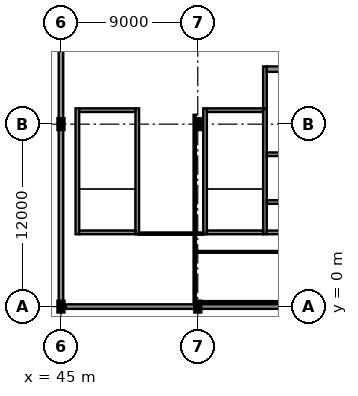
"""IFC4 building model, lengths in metres.
Left out: names, types, materials, properties, quantities, classifications, styles, units other than length and angle.
Written with IfcOpenShell. Run it as: python <this file> out.ifc"""

import sys

from ifc_helpers import new_model, si_unit, direction, frame, frame_2d, origin, origin_2d, place, context, subcontext, project, spatial, rectangle, i_section, extrude, element, fill, save


model = new_model("IFC4")
c1 = context("Model", 3, precision=1e-05, world=origin(), true_north=direction((0.0, 1.0)))
c2 = subcontext(c1, "Body", "Model", "MODEL_VIEW")
j1 = project(units=[si_unit("LENGTHUNIT", "METRE"), si_unit("PLANEANGLEUNIT", "RADIAN")], contexts=[c1])
p1 = place(None, origin())
s1 = spatial("IfcSite", under=j1, at=p1, CompositionType="ELEMENT")
p2 = place(p1, origin())
s2 = spatial("IfcBuilding", under=s1, at=p2, CompositionType="ELEMENT")
p3 = place(p2, frame((0.0, 0.0, 18.9)))
s3 = spatial("IfcBuildingStorey", under=s2, at=p3, CompositionType="ELEMENT", Elevation=18.9)
for number, where, z_axis, x_axis in (
    (1, (45.0, 0.0, 0.0), (0.0, 0.0, 1.0), (0.0, 1.0, 0.0)),
    (2, (45.0, 12.0, 0.0), (0.0, 0.0, 1.0), (1.0, 0.0, 0.0)),
    (3, (54.0, 0.0, 0.0), (0.0, 0.0, 1.0), (1.0, 0.0, 0.0)),
    (4, (54.0, 12.0, 0.0), (0.0, 0.0, 1.0), (1.0, 0.0, 0.0)),
):
    element("IfcColumn", number, at=place(p3, frame(where, z_axis=z_axis, x_axis=x_axis)), inside=s3, PredefinedType="COLUMN", context=c2, shape_type="SweptSolid", body=[
        extrude(i_section(OverallWidth=0.305, OverallDepth=0.62, WebThickness=0.021, FlangeThickness=0.04, at=origin_2d()), origin(), (0.0, 0.0, 1.0), 4.5),
    ])
p4 = place(p3, frame((45.308, 0.0, 0.0), z_axis=(0.0, 0.0, 1.0), x_axis=(1.0, 0.0, 0.0)))
e5 = element("IfcWall", 5, at=p4, inside=s3, PredefinedType="SOLIDWALL", context=c2, shape_type="SweptSolid", body=[
    extrude(rectangle(XDim=8.684, YDim=0.3, at=frame_2d((4.342, 0.0))), origin(), (0.0, 0.0, 1.0), 3.655),
])
p5 = place(p4, frame((1.432, 0.0, 0.85)))
e6 = element("IfcOpeningElement", 6, at=p5, cuts=e5, PredefinedType="OPENING", context=c2, shape_type="SweptSolid", body=[
    extrude(rectangle(XDim=2.0, YDim=2.0, at=frame_2d((1.0, 1.0))), frame((0.0, 0.165, 0.0), z_axis=(0.0, -1.0, 0.0), x_axis=(1.0, 0.0, 0.0)), (0.0, 0.0, 1.0), 0.33),
])
p6 = place(p4, frame((5.252, 0.0, 0.85)))
e7 = element("IfcOpeningElement", 7, at=p6, cuts=e5, PredefinedType="OPENING", context=c2, shape_type="SweptSolid", body=[
    extrude(rectangle(XDim=2.0, YDim=2.0, at=frame_2d((1.0, 1.0))), frame((0.0, 0.165, 0.0), z_axis=(0.0, -1.0, 0.0), x_axis=(1.0, 0.0, 0.0)), (0.0, 0.0, 1.0), 0.33),
])
p7 = place(p3, frame((54.008, 0.0, 0.0), z_axis=(0.0, 0.0, 1.0), x_axis=(1.0, 0.0, 0.0)))
e8 = element("IfcWall", 8, at=p7, inside=s3, PredefinedType="SOLIDWALL", context=c2, shape_type="SweptSolid", body=[
    extrude(rectangle(XDim=8.984, YDim=0.3, at=frame_2d((4.492, 0.0))), origin(), (0.0, 0.0, 1.0), 3.655),
])
p8 = place(p7, frame((1.516, 0.0, 0.85)))
e9 = element("IfcOpeningElement", 9, at=p8, cuts=e8, PredefinedType="OPENING", context=c2, shape_type="SweptSolid", body=[
    extrude(rectangle(XDim=2.0, YDim=2.0, at=frame_2d((1.0, 1.0))), frame((0.0, 0.165, 0.0), z_axis=(0.0, -1.0, 0.0), x_axis=(1.0, 0.0, 0.0)), (0.0, 0.0, 1.0), 0.33),
])
p9 = place(p7, frame((5.468, 0.0, 0.85)))
e10 = element("IfcOpeningElement", 10, at=p9, cuts=e8, PredefinedType="OPENING", context=c2, shape_type="SweptSolid", body=[
    extrude(rectangle(XDim=2.0, YDim=2.0, at=frame_2d((1.0, 1.0))), frame((0.0, 0.165, 0.0), z_axis=(0.0, -1.0, 0.0), x_axis=(1.0, 0.0, 0.0)), (0.0, 0.0, 1.0), 0.33),
])
p10 = place(p3, frame((45.0, 23.644, 0.0), z_axis=(0.0, 0.0, 1.0), x_axis=(0.0, -1.0, 0.0)))
e11 = element("IfcWall", 11, at=p10, inside=s3, PredefinedType="SOLIDWALL", context=c2, shape_type="SweptSolid", body=[
    extrude(rectangle(XDim=11.336, YDim=0.3, at=frame_2d((5.668, 0.0))), origin(), (0.0, 0.0, 1.0), 3.705),
])
p11 = place(p10, frame((2.174, 0.0, 0.85)))
e12 = element("IfcOpeningElement", 12, at=p11, cuts=e11, PredefinedType="OPENING", context=c2, shape_type="SweptSolid", body=[
    extrude(rectangle(XDim=2.0, YDim=2.0, at=frame_2d((1.0, 1.0))), frame((0.0, 0.165, 0.0), z_axis=(0.0, -1.0, 0.0), x_axis=(1.0, 0.0, 0.0)), (0.0, 0.0, 1.0), 0.33),
])
p12 = place(p10, frame((5.604, 0.0, 0.85)))
e13 = element("IfcOpeningElement", 13, at=p12, cuts=e11, PredefinedType="OPENING", context=c2, shape_type="SweptSolid", body=[
    extrude(rectangle(XDim=2.0, YDim=2.0, at=frame_2d((1.0, 1.0))), frame((0.0, 0.165, 0.0), z_axis=(0.0, -1.0, 0.0), x_axis=(1.0, 0.0, 0.0)), (0.0, 0.0, 1.0), 0.33),
])
p13 = place(p3, frame((45.0, 11.692, 0.0), z_axis=(0.0, 0.0, 1.0), x_axis=(0.0, -1.0, 0.0)))
e14 = element("IfcWall", 14, at=p13, inside=s3, PredefinedType="SOLIDWALL", context=c2, shape_type="SweptSolid", body=[
    extrude(rectangle(XDim=11.684, YDim=0.3, at=frame_2d((5.842, 0.0))), origin(), (0.0, 0.0, 1.0), 3.705),
])
p14 = place(p13, frame((2.272, 0.0, 0.85)))
e15 = element("IfcOpeningElement", 15, at=p14, cuts=e14, PredefinedType="OPENING", context=c2, shape_type="SweptSolid", body=[
    extrude(rectangle(XDim=2.0, YDim=2.0, at=frame_2d((1.0, 1.0))), frame((0.0, 0.165, 0.0), z_axis=(0.0, -1.0, 0.0), x_axis=(1.0, 0.0, 0.0)), (0.0, 0.0, 1.0), 0.33),
])
p15 = place(p13, frame((7.412, 0.0, 0.85)))
e16 = element("IfcOpeningElement", 16, at=p15, cuts=e14, PredefinedType="OPENING", context=c2, shape_type="SweptSolid", body=[
    extrude(rectangle(XDim=2.0, YDim=2.0, at=frame_2d((1.0, 1.0))), frame((0.0, 0.165, 0.0), z_axis=(0.0, -1.0, 0.0), x_axis=(1.0, 0.0, 0.0)), (0.0, 0.0, 1.0), 0.33),
])
p16 = place(p3, frame((54.48, 4.76, 0.0), z_axis=(0.0, 0.0, 1.0), x_axis=(0.0, 1.0, 0.0)))
e17 = element("IfcWall", 17, at=p16, inside=s3, PredefinedType="SHEAR", context=c2, shape_type="SweptSolid", body=[
    extrude(rectangle(XDim=8.28, YDim=0.24, at=frame_2d((4.14, 0.0))), origin(), (0.0, 0.0, 1.0), 4.31),
])
p17 = place(p3, frame((58.42, 4.76, 0.0), z_axis=(0.0, 0.0, 1.0), x_axis=(0.0, 1.0, 0.0)))
e18 = element("IfcWall", 18, at=p17, inside=s3, PredefinedType="SHEAR", context=c2, shape_type="SweptSolid", body=[
    extrude(rectangle(XDim=8.28, YDim=0.24, at=frame_2d((4.14, 0.0))), origin(), (0.0, 0.0, 1.0), 4.31),
])
p18 = place(p17, frame((6.49, 0.0, 0.0)))
e19 = element("IfcOpeningElement", 19, at=p18, cuts=e18, PredefinedType="OPENING", context=c2, shape_type="SweptSolid", body=[
    extrude(rectangle(XDim=1.3, YDim=2.2, at=frame_2d((0.65, 1.1))), frame((0.0, 0.135, 0.0), z_axis=(0.0, -1.0, 0.0), x_axis=(1.0, 0.0, 0.0)), (0.0, 0.0, 1.0), 0.27),
])
for number, where, z_axis, x_axis in (
    (20, (54.6, 4.88, 0.0), (0.0, 0.0, 1.0), (1.0, 0.0, 0.0)),
    (21, (54.6, 12.92, 0.0), (0.0, 0.0, 1.0), (1.0, 0.0, 0.0)),
):
    element("IfcWall", number, at=place(p3, frame(where, z_axis=z_axis, x_axis=x_axis)), inside=s3, PredefinedType="SHEAR", context=c2, shape_type="SweptSolid", body=[
        extrude(rectangle(XDim=3.7, YDim=0.24, at=frame_2d((1.85, 0.0))), origin(), (0.0, 0.0, 1.0), 4.31),
    ])
p19 = place(p3, frame((46.08, 4.76, 0.0), z_axis=(0.0, 0.0, 1.0), x_axis=(0.0, 1.0, 0.0)))
e22 = element("IfcWall", 22, at=p19, inside=s3, PredefinedType="SHEAR", context=c2, shape_type="SweptSolid", body=[
    extrude(rectangle(XDim=8.28, YDim=0.24, at=frame_2d((4.14, 0.0))), origin(), (0.0, 0.0, 1.0), 4.31),
])
p20 = place(p3, frame((50.02, 4.76, 0.0), z_axis=(0.0, 0.0, 1.0), x_axis=(0.0, 1.0, 0.0)))
e23 = element("IfcWall", 23, at=p20, inside=s3, PredefinedType="SHEAR", context=c2, shape_type="SweptSolid", body=[
    extrude(rectangle(XDim=8.28, YDim=0.24, at=frame_2d((4.14, 0.0))), origin(), (0.0, 0.0, 1.0), 4.31),
])
p21 = place(p20, frame((6.49, 0.0, 0.0)))
e24 = element("IfcOpeningElement", 24, at=p21, cuts=e23, PredefinedType="OPENING", context=c2, shape_type="SweptSolid", body=[
    extrude(rectangle(XDim=1.3, YDim=2.2, at=frame_2d((0.65, 1.1))), frame((0.0, 0.135, 0.0), z_axis=(0.0, -1.0, 0.0), x_axis=(1.0, 0.0, 0.0)), (0.0, 0.0, 1.0), 0.27),
])
for number, where, z_axis, x_axis in (
    (25, (46.2, 4.88, 0.0), (0.0, 0.0, 1.0), (1.0, 0.0, 0.0)),
    (26, (46.2, 12.92, 0.0), (0.0, 0.0, 1.0), (1.0, 0.0, 0.0)),
):
    element("IfcWall", number, at=place(p3, frame(where, z_axis=z_axis, x_axis=x_axis)), inside=s3, PredefinedType="SHEAR", context=c2, shape_type="SweptSolid", body=[
        extrude(rectangle(XDim=3.7, YDim=0.24, at=frame_2d((1.85, 0.0))), origin(), (0.0, 0.0, 1.0), 4.31),
    ])
p22 = place(p3, frame((58.42, 13.04, 0.0), z_axis=(0.0, 0.0, 1.0), x_axis=(0.0, 1.0, 0.0)))
e27 = element("IfcWall", 27, at=p22, inside=s3, PredefinedType="SHEAR", context=c2, shape_type="SweptSolid", body=[
    extrude(rectangle(XDim=2.76, YDim=0.24, at=frame_2d((1.38, 0.0))), origin(), (0.0, 0.0, 1.0), 4.16),
])
p23 = place(p3, frame((58.54, 15.62, 0.0), z_axis=(0.0, 0.0, 1.0), x_axis=(1.0, 0.0, 0.0)))
e28 = element("IfcWall", 28, at=p23, inside=s3, PredefinedType="SHEAR", context=c2, shape_type="SweptSolid", body=[
    extrude(rectangle(XDim=3.9, YDim=0.36, at=frame_2d((1.95, 0.0))), origin(), (0.0, 0.0, 1.0), 4.16),
])
p24 = place(p23, frame((1.15, 0.0, 0.0)))
e29 = element("IfcOpeningElement", 29, at=p24, cuts=e28, PredefinedType="OPENING", context=c2, shape_type="SweptSolid", body=[
    extrude(rectangle(XDim=1.6, YDim=2.25, at=frame_2d((0.8, 1.125))), frame((0.0, 0.195, 0.0), z_axis=(0.0, -1.0, 0.0), x_axis=(1.0, 0.0, 0.0)), (0.0, 0.0, 1.0), 0.39),
])
p25 = place(p3, frame((58.54, 10.02, 0.0), z_axis=(0.0, 0.0, 1.0), x_axis=(1.0, 0.0, 0.0)))
e30 = element("IfcWall", 30, at=p25, inside=s3, PredefinedType="SHEAR", context=c2, shape_type="SweptSolid", body=[
    extrude(rectangle(XDim=3.9, YDim=0.24, at=frame_2d((1.95, 0.0))), origin(), (0.0, 0.0, 1.0), 4.31),
])
p26 = place(p25, frame((0.235, 0.0, 0.0)))
e31 = element("IfcOpeningElement", 31, at=p26, cuts=e30, PredefinedType="OPENING", context=c2, shape_type="SweptSolid", body=[
    extrude(rectangle(XDim=1.6, YDim=2.3, at=frame_2d((0.8, 1.15))), frame((0.0, 0.135, 0.0), z_axis=(0.0, -1.0, 0.0), x_axis=(1.0, 0.0, 0.0)), (0.0, 0.0, 1.0), 0.27),
])
p27 = place(p25, frame((2.185, 0.0, 0.0)))
e32 = element("IfcOpeningElement", 32, at=p27, cuts=e30, PredefinedType="OPENING", context=c2, shape_type="SweptSolid", body=[
    extrude(rectangle(XDim=1.6, YDim=2.3, at=frame_2d((0.8, 1.15))), frame((0.0, 0.135, 0.0), z_axis=(0.0, -1.0, 0.0), x_axis=(1.0, 0.0, 0.0)), (0.0, 0.0, 1.0), 0.27),
])
p28 = place(p3, frame((58.54, 6.88, 0.0), z_axis=(0.0, 0.0, 1.0), x_axis=(1.0, 0.0, 0.0)))
e33 = element("IfcWall", 33, at=p28, inside=s3, PredefinedType="SHEAR", context=c2, shape_type="SweptSolid", body=[
    extrude(rectangle(XDim=3.9, YDim=0.24, at=frame_2d((1.95, 0.0))), origin(), (0.0, 0.0, 1.0), 4.31),
])
p29 = place(p3, frame((58.54, 4.88, 0.0), z_axis=(0.0, 0.0, 1.0), x_axis=(1.0, 0.0, 0.0)))
e34 = element("IfcWall", 34, at=p29, inside=s3, PredefinedType="SHEAR", context=c2, shape_type="SweptSolid", body=[
    extrude(rectangle(XDim=2.26, YDim=0.24, at=frame_2d((1.13, 0.0))), origin(), (0.0, 0.0, 1.0), 4.31),
])
p30 = place(p3, frame((50.113, 4.8, 0.0), z_axis=(0.0, 0.0, 1.0), x_axis=(1.0, 0.0, 0.0)))
e35 = element("IfcWall", 35, at=p30, inside=s3, PredefinedType="PARTITIONING", context=c2, shape_type="SweptSolid", body=[
    extrude(rectangle(XDim=4.252, YDim=0.15, at=frame_2d((2.126, 0.0))), origin(), (0.0, 0.0, 1.0), 4.14),
])
p31 = place(p30, frame((1.601, 0.0, 0.0)))
e36 = element("IfcOpeningElement", 36, at=p31, cuts=e35, PredefinedType="OPENING", context=c2, shape_type="SweptSolid", body=[
    extrude(rectangle(XDim=1.05, YDim=2.25, at=frame_2d((0.525, 1.125))), frame((0.0, 0.09, 0.0), z_axis=(0.0, -1.0, 0.0), x_axis=(1.0, 0.0, 0.0)), (0.0, 0.0, 1.0), 0.18),
])
p32 = place(p3, frame((53.8, 4.73, 0.0), z_axis=(0.0, 0.0, 1.0), x_axis=(0.0, -1.0, 0.0)))
e37 = element("IfcWall", 37, at=p32, inside=s3, PredefinedType="PARTITIONING", context=c2, shape_type="SweptSolid", body=[
    extrude(rectangle(XDim=4.422, YDim=0.15, at=frame_2d((2.211, 0.0))), origin(), (0.0, 0.0, 1.0), 3.655),
])
p33 = place(p3, frame((107.721, 0.3, 0.0), z_axis=(0.0, 0.0, 1.0), x_axis=(-1.0, 0.0, 0.0)))
e38 = element("IfcWall", 38, at=p33, inside=s3, PredefinedType="PARTITIONING", context=c2, shape_type="SweptSolid", body=[
    extrude(rectangle(XDim=53.741, YDim=0.12, at=frame_2d((26.871, 0.0))), origin(), (0.0, 0.0, 1.0), 4.14),
])
p34 = place(p3, frame((53.87, 3.6, 0.0), z_axis=(0.0, 0.0, 1.0), x_axis=(1.0, 0.0, 0.0)))
e39 = element("IfcWall", 39, at=p34, inside=s3, PredefinedType="PARTITIONING", context=c2, shape_type="SweptSolid", body=[
    extrude(rectangle(XDim=63.25, YDim=0.12, at=frame_2d((31.625, 0.0))), origin(), (0.0, 0.0, 1.0), 4.14),
])
p35 = place(p34, frame((19.855, 0.0, 0.0)))
e40 = element("IfcOpeningElement", 40, at=p35, cuts=e39, PredefinedType="OPENING", context=c2, shape_type="SweptSolid", body=[
    extrude(rectangle(XDim=0.95, YDim=2.15, at=frame_2d((0.475, 1.075))), frame((0.0, 0.075, 0.0), z_axis=(0.0, -1.0, 0.0), x_axis=(1.0, 0.0, 0.0)), (0.0, 0.0, 1.0), 0.15),
])
p36 = place(p3, frame((53.8, 12.62, 0.0), z_axis=(0.0, 0.0, 1.0), x_axis=(0.0, -1.0, 0.0)))
e41 = element("IfcWall", 41, at=p36, inside=s3, PredefinedType="PARTITIONING", context=c2, shape_type="SweptSolid", body=[
    extrude(rectangle(XDim=7.75, YDim=0.15, at=frame_2d((3.875, 0.0))), origin(), (0.0, 0.0, 1.0), 3.655),
])
p37 = place(p5, origin())
e42 = element("IfcWindow", 42, at=p37, inside=s3, PartitioningType="SINGLE_PANEL", PredefinedType="WINDOW", context=c2, shape_type="SweptSolid", body=[
    extrude(rectangle(XDim=2.0, YDim=2.0, at=frame_2d((1.0, 1.0))), frame((0.0, 0.03, 0.0), z_axis=(0.0, -1.0, 0.0), x_axis=(1.0, 0.0, 0.0)), (0.0, 0.0, 1.0), 0.06),
])
fill(e6, e42)
p38 = place(p6, origin())
e43 = element("IfcWindow", 43, at=p38, inside=s3, PartitioningType="SINGLE_PANEL", PredefinedType="WINDOW", context=c2, shape_type="SweptSolid", body=[
    extrude(rectangle(XDim=2.0, YDim=2.0, at=frame_2d((1.0, 1.0))), frame((0.0, 0.03, 0.0), z_axis=(0.0, -1.0, 0.0), x_axis=(1.0, 0.0, 0.0)), (0.0, 0.0, 1.0), 0.06),
])
fill(e7, e43)
p39 = place(p8, origin())
e44 = element("IfcWindow", 44, at=p39, inside=s3, PartitioningType="SINGLE_PANEL", PredefinedType="WINDOW", context=c2, shape_type="SweptSolid", body=[
    extrude(rectangle(XDim=2.0, YDim=2.0, at=frame_2d((1.0, 1.0))), frame((0.0, 0.03, 0.0), z_axis=(0.0, -1.0, 0.0), x_axis=(1.0, 0.0, 0.0)), (0.0, 0.0, 1.0), 0.06),
])
fill(e9, e44)
p40 = place(p12, origin())
e45 = element("IfcWindow", 45, at=p40, inside=s3, PartitioningType="SINGLE_PANEL", PredefinedType="WINDOW", context=c2, shape_type="SweptSolid", body=[
    extrude(rectangle(XDim=2.0, YDim=2.0, at=frame_2d((1.0, 1.0))), frame((0.0, 0.03, 0.0), z_axis=(0.0, -1.0, 0.0), x_axis=(1.0, 0.0, 0.0)), (0.0, 0.0, 1.0), 0.06),
])
fill(e13, e45)
p41 = place(p14, origin())
e46 = element("IfcWindow", 46, at=p41, inside=s3, PartitioningType="SINGLE_PANEL", PredefinedType="WINDOW", context=c2, shape_type="SweptSolid", body=[
    extrude(rectangle(XDim=2.0, YDim=2.0, at=frame_2d((1.0, 1.0))), frame((0.0, 0.03, 0.0), z_axis=(0.0, -1.0, 0.0), x_axis=(1.0, 0.0, 0.0)), (0.0, 0.0, 1.0), 0.06),
])
fill(e15, e46)
p42 = place(p15, origin())
e47 = element("IfcWindow", 47, at=p42, inside=s3, PartitioningType="SINGLE_PANEL", PredefinedType="WINDOW", context=c2, shape_type="SweptSolid", body=[
    extrude(rectangle(XDim=2.0, YDim=2.0, at=frame_2d((1.0, 1.0))), frame((0.0, 0.03, 0.0), z_axis=(0.0, -1.0, 0.0), x_axis=(1.0, 0.0, 0.0)), (0.0, 0.0, 1.0), 0.06),
])
fill(e16, e47)
p43 = place(p18, frame((1.3, 0.0, 0.0), z_axis=(0.0, 0.0, 1.0), x_axis=(-1.0, 0.0, 0.0)))
e48 = element("IfcDoor", 48, at=p43, inside=s3, OperationType="SINGLE_SWING_RIGHT", PredefinedType="DOOR", context=c2, shape_type="SweptSolid", body=[
    extrude(rectangle(XDim=1.3, YDim=2.2, at=frame_2d((0.65, 1.1))), frame((0.0, 0.025, 0.0), z_axis=(0.0, -1.0, 0.0), x_axis=(1.0, 0.0, 0.0)), (0.0, 0.0, 1.0), 0.05),
])
fill(e19, e48)
p44 = place(p21, frame((1.3, 0.0, 0.0), z_axis=(0.0, 0.0, 1.0), x_axis=(-1.0, 0.0, 0.0)))
e49 = element("IfcDoor", 49, at=p44, inside=s3, OperationType="SINGLE_SWING_RIGHT", PredefinedType="DOOR", context=c2, shape_type="SweptSolid", body=[
    extrude(rectangle(XDim=1.3, YDim=2.2, at=frame_2d((0.65, 1.1))), frame((0.0, 0.025, 0.0), z_axis=(0.0, -1.0, 0.0), x_axis=(1.0, 0.0, 0.0)), (0.0, 0.0, 1.0), 0.05),
])
fill(e24, e49)
p45 = place(p26, origin())
e50 = element("IfcDoor", 50, at=p45, inside=s3, OperationType="DOUBLE_DOOR_SLIDING", PredefinedType="DOOR", context=c2, shape_type="SweptSolid", body=[
    extrude(rectangle(XDim=1.6, YDim=2.3, at=frame_2d((0.8, 1.15))), frame((0.0, 0.025, 0.0), z_axis=(0.0, -1.0, 0.0), x_axis=(1.0, 0.0, 0.0)), (0.0, 0.0, 1.0), 0.05),
])
fill(e31, e50)
p46 = place(p31, origin())
e51 = element("IfcDoor", 51, at=p46, inside=s3, OperationType="SINGLE_SWING_RIGHT", PredefinedType="DOOR", context=c2, shape_type="SweptSolid", body=[
    extrude(rectangle(XDim=1.05, YDim=2.25, at=frame_2d((0.525, 1.125))), frame((0.0, 0.025, 0.0), z_axis=(0.0, -1.0, 0.0), x_axis=(1.0, 0.0, 0.0)), (0.0, 0.0, 1.0), 0.05),
])
fill(e36, e51)
save(model, sys.argv[1])
